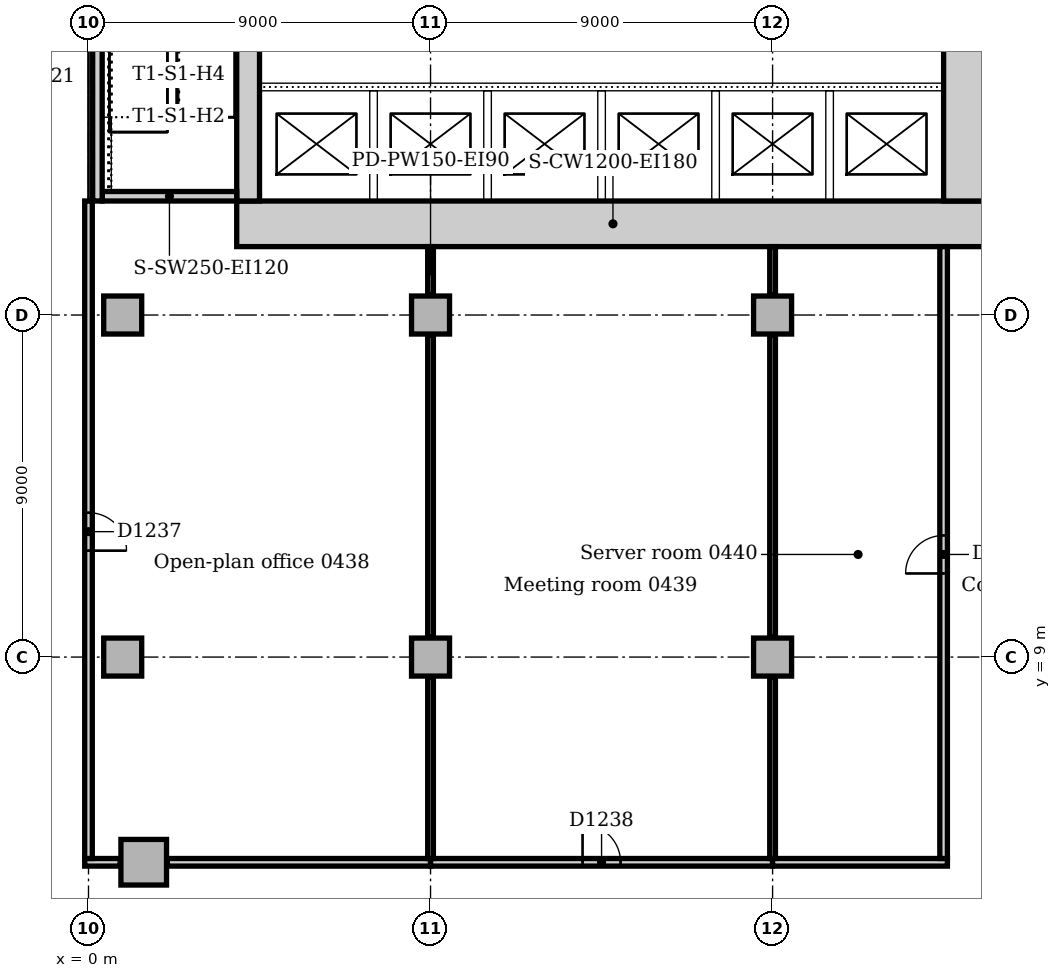
"""IFC4 building model, lengths in metres.
Left out: names, types, materials, properties, quantities, classifications, styles, units other than length and angle.
Written with IfcOpenShell. Run it as: python <this file> out.ifc"""

import sys

from ifc_helpers import new_model, si_unit, direction, frame, frame_2d, origin, origin_2d, place, context, subcontext, project, spatial, rectangle, extrude, element, fill, save


model = new_model("IFC4")
c1 = context("Model", 3, precision=1e-05, world=origin(), true_north=direction((0.0, 1.0)))
c2 = subcontext(c1, "Body", "Model", "MODEL_VIEW")
j1 = project(units=[si_unit("LENGTHUNIT", "METRE"), si_unit("PLANEANGLEUNIT", "RADIAN")], contexts=[c1])
p1 = place(None, origin())
s1 = spatial("IfcSite", under=j1, at=p1, CompositionType="ELEMENT")
p2 = place(p1, origin())
s2 = spatial("IfcBuilding", under=s1, at=p2, CompositionType="ELEMENT")
p3 = place(p2, frame((0.0, 0.0, 21.0)))
s3 = spatial("IfcBuildingStorey", under=s2, at=p3, CompositionType="ELEMENT", Elevation=21.0)
p4 = place(p3, frame((3.9, 20.4, 0.0), z_axis=(0.0, 0.0, 1.0), x_axis=(1.0, 0.0, 0.0)))
e1 = element("IfcWall", 1, at=p4, inside=s3, PredefinedType="SOLIDWALL", context=c2, shape_type="SweptSolid", body=[
    extrude(rectangle(XDim=19.8, YDim=1.2, at=frame_2d((9.9, 0.0))), origin(), (0.0, 0.0, 1.0), 5.0),
])
p5 = place(p3, frame((23.1, 21.0, 0.0), z_axis=(0.0, 0.0, 1.0), x_axis=(0.0, 1.0, 0.0)))
e2 = element("IfcWall", 2, at=p5, inside=s3, PredefinedType="SOLIDWALL", context=c2, shape_type="SweptSolid", body=[
    extrude(rectangle(XDim=10.5, YDim=1.2, at=frame_2d((5.25, 0.0))), origin(), (0.0, 0.0, 1.0), 5.0),
])
p6 = place(p5, frame((4.35, 0.0, 0.0)))
e3 = element("IfcOpeningElement", 3, at=p6, cuts=e2, PredefinedType="OPENING", context=c2, shape_type="SweptSolid", body=[
    extrude(rectangle(XDim=1.8, YDim=2.1, at=frame_2d((0.9, 1.05))), frame((0.0, 0.61, 0.0), z_axis=(0.0, -1.0, 0.0), x_axis=(1.0, 0.0, 0.0)), (0.0, 0.0, 1.0), 1.22),
])
p7 = place(p3, frame((4.2, 31.5, 0.0), z_axis=(0.0, 0.0, 1.0), x_axis=(0.0, -1.0, 0.0)))
e4 = element("IfcWall", 4, at=p7, inside=s3, PredefinedType="SOLIDWALL", context=c2, shape_type="SweptSolid", body=[
    extrude(rectangle(XDim=10.5, YDim=0.6, at=frame_2d((5.25, 0.0))), origin(), (0.0, 0.0, 1.0), 5.0),
])
p8 = place(p7, frame((4.25, 0.0, 0.0)))
e5 = element("IfcOpeningElement", 5, at=p8, cuts=e4, PredefinedType="OPENING", context=c2, shape_type="SweptSolid", body=[
    extrude(rectangle(XDim=1.0, YDim=2.1, at=frame_2d((0.5, 1.05))), frame((0.0, 0.31, 0.0), z_axis=(0.0, -1.0, 0.0), x_axis=(1.0, 0.0, 0.0)), (0.0, 0.0, 1.0), 0.62),
])
p9 = place(p3, frame((0.36, 21.125, 0.0), z_axis=(0.0, 0.0, 1.0), x_axis=(1.0, 0.0, 0.0)))
e6 = element("IfcWall", 6, at=p9, inside=s3, PredefinedType="SOLIDWALL", context=c2, shape_type="SweptSolid", body=[
    extrude(rectangle(XDim=3.54, YDim=0.25, at=frame_2d((1.77, 0.0))), origin(), (0.0, 0.0, 1.0), 5.0),
])
p10 = place(p3, frame((0.235, 21.0, 0.0), z_axis=(0.0, 0.0, 1.0), x_axis=(0.0, 1.0, 0.0)))
e7 = element("IfcWall", 7, at=p10, inside=s3, PredefinedType="SOLIDWALL", context=c2, shape_type="SweptSolid", body=[
    extrude(rectangle(XDim=21.0, YDim=0.25, at=frame_2d((10.5, 0.0))), origin(), (0.0, 0.0, 1.0), 5.0),
])
p11 = place(p3, frame((1.453, 3.602, 0.0), z_axis=(0.0, 0.0, 1.0), x_axis=(1.0, 0.0, 0.0)))
e8 = element("IfcColumn", 8, at=p11, inside=s3, PredefinedType="COLUMN", context=c2, shape_type="SweptSolid", body=[
    extrude(rectangle(XDim=1.2, YDim=1.2, at=origin_2d()), origin(), (0.0, 0.0, 1.0), 4.85),
])
for number, where, z_axis, x_axis in (
    (9, (0.9, 9.0, 0.0), (0.0, 0.0, 1.0), (1.0, 0.0, 0.0)),
    (10, (0.9, 18.0, 0.0), (0.0, 0.0, 1.0), (1.0, 0.0, 0.0)),
    (11, (9.0, 9.0, 0.0), (0.0, 0.0, 1.0), (1.0, 0.0, 0.0)),
    (12, (9.0, 18.0, 0.0), (0.0, 0.0, 1.0), (1.0, 0.0, 0.0)),
    (13, (18.0, 9.0, 0.0), (0.0, 0.0, 1.0), (1.0, 0.0, 0.0)),
    (14, (18.0, 18.0, 0.0), (0.0, 0.0, 1.0), (1.0, 0.0, 0.0)),
):
    element("IfcColumn", number, at=place(p3, frame(where, z_axis=z_axis, x_axis=x_axis)), inside=s3, PredefinedType="COLUMN", context=c2, shape_type="SweptSolid", body=[
        extrude(rectangle(XDim=1.0, YDim=1.0, at=origin_2d()), origin(), (0.0, 0.0, 1.0), 4.85),
    ])
p12 = place(p3, frame((-0.1, 3.6, 0.0), z_axis=(0.0, 0.0, 1.0), x_axis=(1.0, 0.0, 0.0)))
e15 = element("IfcWall", 15, at=p12, inside=s3, PredefinedType="PARTITIONING", context=c2, shape_type="SweptSolid", body=[
    extrude(rectangle(XDim=0.933, YDim=0.2, at=frame_2d((0.467, 0.0))), origin(), (0.0, 0.0, 1.0), 4.7),
])
p13 = place(p3, frame((2.073, 3.6, 0.0), z_axis=(0.0, 0.0, 1.0), x_axis=(1.0, 0.0, 0.0)))
e16 = element("IfcWall", 16, at=p13, inside=s3, PredefinedType="PARTITIONING", context=c2, shape_type="SweptSolid", body=[
    extrude(rectangle(XDim=6.927, YDim=0.2, at=frame_2d((3.463, 0.0))), origin(), (0.0, 0.0, 1.0), 4.85),
])
p14 = place(p3, frame((9.0, 3.6, 0.0), z_axis=(0.0, 0.0, 1.0), x_axis=(1.0, 0.0, 0.0)))
e17 = element("IfcWall", 17, at=p14, inside=s3, PredefinedType="PARTITIONING", context=c2, shape_type="SweptSolid", body=[
    extrude(rectangle(XDim=9.0, YDim=0.2, at=frame_2d((4.5, 0.0))), origin(), (0.0, 0.0, 1.0), 4.85),
])
p15 = place(p14, frame((4.0, 0.0, 0.0)))
e18 = element("IfcOpeningElement", 18, at=p15, cuts=e17, PredefinedType="OPENING", context=c2, shape_type="SweptSolid", body=[
    extrude(rectangle(XDim=1.0, YDim=2.1, at=frame_2d((0.5, 1.05))), frame((0.0, 0.11, 0.0), z_axis=(0.0, -1.0, 0.0), x_axis=(1.0, 0.0, 0.0)), (0.0, 0.0, 1.0), 0.22),
])
p16 = place(p3, frame((18.0, 3.6, 0.0), z_axis=(0.0, 0.0, 1.0), x_axis=(1.0, 0.0, 0.0)))
e19 = element("IfcWall", 19, at=p16, inside=s3, PredefinedType="PARTITIONING", context=c2, shape_type="SweptSolid", body=[
    extrude(rectangle(XDim=4.6, YDim=0.2, at=frame_2d((2.3, 0.0))), origin(), (0.0, 0.0, 1.0), 4.85),
])
p17 = place(p3, frame((22.5, 3.7, 0.0), z_axis=(0.0, 0.0, 1.0), x_axis=(0.0, 1.0, 0.0)))
e20 = element("IfcWall", 20, at=p17, inside=s3, PredefinedType="PARTITIONING", context=c2, shape_type="SweptSolid", body=[
    extrude(rectangle(XDim=16.1, YDim=0.2, at=frame_2d((8.05, 0.0))), origin(), (0.0, 0.0, 1.0), 4.85),
])
p18 = place(p17, frame((7.5, 0.0, 0.0)))
e21 = element("IfcOpeningElement", 21, at=p18, cuts=e20, PredefinedType="OPENING", context=c2, shape_type="SweptSolid", body=[
    extrude(rectangle(XDim=1.0, YDim=2.1, at=frame_2d((0.5, 1.05))), frame((0.0, 0.11, 0.0), z_axis=(0.0, -1.0, 0.0), x_axis=(1.0, 0.0, 0.0)), (0.0, 0.0, 1.0), 0.22),
])
p19 = place(p3, frame((0.0, 3.7, 0.0), z_axis=(0.0, 0.0, 1.0), x_axis=(0.0, 1.0, 0.0)))
e22 = element("IfcWall", 22, at=p19, inside=s3, PredefinedType="PARTITIONING", context=c2, shape_type="SweptSolid", body=[
    extrude(rectangle(XDim=17.3, YDim=0.2, at=frame_2d((8.65, 0.0))), origin(), (0.0, 0.0, 1.0), 4.85),
])
p20 = place(p19, frame((8.1, 0.0, 0.0)))
e23 = element("IfcOpeningElement", 23, at=p20, cuts=e22, PredefinedType="OPENING", context=c2, shape_type="SweptSolid", body=[
    extrude(rectangle(XDim=1.0, YDim=2.1, at=frame_2d((0.5, 1.05))), frame((0.0, 0.11, 0.0), z_axis=(0.0, -1.0, 0.0), x_axis=(1.0, 0.0, 0.0)), (0.0, 0.0, 1.0), 0.22),
])
p21 = place(p3, frame((9.0, 3.7, 0.0), z_axis=(0.0, 0.0, 1.0), x_axis=(0.0, 1.0, 0.0)))
e24 = element("IfcWall", 24, at=p21, inside=s3, PredefinedType="PARTITIONING", context=c2, shape_type="SweptSolid", body=[
    extrude(rectangle(XDim=4.78, YDim=0.15, at=frame_2d((2.39, 0.0))), origin(), (0.0, 0.0, 1.0), 4.158),
])
p22 = place(p3, frame((9.0, 9.52, 0.0), z_axis=(0.0, 0.0, 1.0), x_axis=(0.0, 1.0, 0.0)))
e25 = element("IfcWall", 25, at=p22, inside=s3, PredefinedType="PARTITIONING", context=c2, shape_type="SweptSolid", body=[
    extrude(rectangle(XDim=7.96, YDim=0.15, at=frame_2d((3.98, 0.0))), origin(), (0.0, 0.0, 1.0), 4.158),
])
p23 = place(p3, frame((9.0, 18.52, 0.0), z_axis=(0.0, 0.0, 1.0), x_axis=(0.0, 1.0, 0.0)))
e26 = element("IfcWall", 26, at=p23, inside=s3, PredefinedType="PARTITIONING", context=c2, shape_type="SweptSolid", body=[
    extrude(rectangle(XDim=1.28, YDim=0.15, at=frame_2d((0.64, 0.0))), origin(), (0.0, 0.0, 1.0), 4.652),
])
p24 = place(p3, frame((18.0, 3.7, 0.0), z_axis=(0.0, 0.0, 1.0), x_axis=(0.0, 1.0, 0.0)))
e27 = element("IfcWall", 27, at=p24, inside=s3, PredefinedType="PARTITIONING", context=c2, shape_type="SweptSolid", body=[
    extrude(rectangle(XDim=4.78, YDim=0.15, at=frame_2d((2.39, 0.0))), origin(), (0.0, 0.0, 1.0), 4.158),
])
p25 = place(p3, frame((18.0, 9.52, 0.0), z_axis=(0.0, 0.0, 1.0), x_axis=(0.0, 1.0, 0.0)))
e28 = element("IfcWall", 28, at=p25, inside=s3, PredefinedType="PARTITIONING", context=c2, shape_type="SweptSolid", body=[
    extrude(rectangle(XDim=7.96, YDim=0.15, at=frame_2d((3.98, 0.0))), origin(), (0.0, 0.0, 1.0), 4.158),
])
p26 = place(p3, frame((18.0, 18.52, 0.0), z_axis=(0.0, 0.0, 1.0), x_axis=(0.0, 1.0, 0.0)))
e29 = element("IfcWall", 29, at=p26, inside=s3, PredefinedType="PARTITIONING", context=c2, shape_type="SweptSolid", body=[
    extrude(rectangle(XDim=1.28, YDim=0.15, at=frame_2d((0.64, 0.0))), origin(), (0.0, 0.0, 1.0), 4.652),
])
p27 = place(p3, frame((0.48, 21.25, 0.0), z_axis=(0.0, 0.0, 1.0), x_axis=(0.0, 1.0, 0.0)))
e30 = element("IfcWall", 30, at=p27, inside=s3, PredefinedType="STANDARD", context=c2, shape_type="SweptSolid", body=[
    extrude(rectangle(XDim=1.955, YDim=0.24, at=frame_2d((0.978, 0.0))), origin(), (0.0, 0.0, 1.0), 5.0),
])
p28 = place(p3, frame((4.5, 24.0, 0.0), z_axis=(0.0, 0.0, 1.0), x_axis=(1.0, 0.0, 0.0)))
e31 = element("IfcWall", 31, at=p28, inside=s3, PredefinedType="PARTITIONING", context=c2, shape_type="SweptSolid", body=[
    extrude(rectangle(XDim=18.0, YDim=0.2, at=frame_2d((9.0, 0.0))), origin(), (0.0, 0.0, 1.0), 4.85),
])
p29 = place(p28, frame((0.95, 0.0, 0.0)))
e32 = element("IfcOpeningElement", 32, at=p29, cuts=e31, PredefinedType="OPENING", context=c2, shape_type="SweptSolid", body=[
    extrude(rectangle(XDim=1.1, YDim=2.1, at=frame_2d((0.55, 1.05))), frame((0.0, 0.11, 0.0), z_axis=(0.0, -1.0, 0.0), x_axis=(1.0, 0.0, 0.0)), (0.0, 0.0, 1.0), 0.22),
])
p30 = place(p28, frame((3.95, 0.0, 0.0)))
e33 = element("IfcOpeningElement", 33, at=p30, cuts=e31, PredefinedType="OPENING", context=c2, shape_type="SweptSolid", body=[
    extrude(rectangle(XDim=1.1, YDim=2.1, at=frame_2d((0.55, 1.05))), frame((0.0, 0.11, 0.0), z_axis=(0.0, -1.0, 0.0), x_axis=(1.0, 0.0, 0.0)), (0.0, 0.0, 1.0), 0.22),
])
p31 = place(p28, frame((6.95, 0.0, 0.0)))
e34 = element("IfcOpeningElement", 34, at=p31, cuts=e31, PredefinedType="OPENING", context=c2, shape_type="SweptSolid", body=[
    extrude(rectangle(XDim=1.1, YDim=2.1, at=frame_2d((0.55, 1.05))), frame((0.0, 0.11, 0.0), z_axis=(0.0, -1.0, 0.0), x_axis=(1.0, 0.0, 0.0)), (0.0, 0.0, 1.0), 0.22),
])
p32 = place(p28, frame((9.95, 0.0, 0.0)))
e35 = element("IfcOpeningElement", 35, at=p32, cuts=e31, PredefinedType="OPENING", context=c2, shape_type="SweptSolid", body=[
    extrude(rectangle(XDim=1.1, YDim=2.1, at=frame_2d((0.55, 1.05))), frame((0.0, 0.11, 0.0), z_axis=(0.0, -1.0, 0.0), x_axis=(1.0, 0.0, 0.0)), (0.0, 0.0, 1.0), 0.22),
])
p33 = place(p28, frame((12.95, 0.0, 0.0)))
e36 = element("IfcOpeningElement", 36, at=p33, cuts=e31, PredefinedType="OPENING", context=c2, shape_type="SweptSolid", body=[
    extrude(rectangle(XDim=1.1, YDim=2.1, at=frame_2d((0.55, 1.05))), frame((0.0, 0.11, 0.0), z_axis=(0.0, -1.0, 0.0), x_axis=(1.0, 0.0, 0.0)), (0.0, 0.0, 1.0), 0.22),
])
p34 = place(p28, frame((15.95, 0.0, 0.0)))
e37 = element("IfcOpeningElement", 37, at=p34, cuts=e31, PredefinedType="OPENING", context=c2, shape_type="SweptSolid", body=[
    extrude(rectangle(XDim=1.1, YDim=2.1, at=frame_2d((0.55, 1.05))), frame((0.0, 0.11, 0.0), z_axis=(0.0, -1.0, 0.0), x_axis=(1.0, 0.0, 0.0)), (0.0, 0.0, 1.0), 0.22),
])
for number, where, z_axis, x_axis in (
    (38, (7.5, 21.0, 0.0), (0.0, 0.0, 1.0), (0.0, 1.0, 0.0)),
    (39, (10.5, 21.0, 0.0), (0.0, 0.0, 1.0), (0.0, 1.0, 0.0)),
    (40, (13.5, 21.0, 0.0), (0.0, 0.0, 1.0), (0.0, 1.0, 0.0)),
    (41, (16.5, 21.0, 0.0), (0.0, 0.0, 1.0), (0.0, 1.0, 0.0)),
    (42, (19.5, 21.0, 0.0), (0.0, 0.0, 1.0), (0.0, 1.0, 0.0)),
):
    element("IfcWall", number, at=place(p3, frame(where, z_axis=z_axis, x_axis=x_axis)), inside=s3, PredefinedType="PARTITIONING", context=c2, shape_type="SweptSolid", body=[
        extrude(rectangle(XDim=2.9, YDim=0.2, at=frame_2d((1.45, 0.0))), origin(), (0.0, 0.0, 1.0), 4.85),
    ])
p35 = place(p20, frame((1.0, 0.0, 0.0), z_axis=(0.0, 0.0, 1.0), x_axis=(-1.0, 0.0, 0.0)))
e43 = element("IfcDoor", 43, at=p35, inside=s3, OperationType="SINGLE_SWING_RIGHT", PredefinedType="DOOR", context=c2, shape_type="SweptSolid", body=[
    extrude(rectangle(XDim=1.0, YDim=2.1, at=frame_2d((0.5, 1.05))), frame((0.0, 0.025, 0.0), z_axis=(0.0, -1.0, 0.0), x_axis=(1.0, 0.0, 0.0)), (0.0, 0.0, 1.0), 0.05),
])
fill(e23, e43)
p36 = place(p15, origin())
e44 = element("IfcDoor", 44, at=p36, inside=s3, OperationType="SINGLE_SWING_LEFT", PredefinedType="DOOR", context=c2, shape_type="SweptSolid", body=[
    extrude(rectangle(XDim=1.0, YDim=2.1, at=frame_2d((0.5, 1.05))), frame((0.0, 0.025, 0.0), z_axis=(0.0, -1.0, 0.0), x_axis=(1.0, 0.0, 0.0)), (0.0, 0.0, 1.0), 0.05),
])
fill(e18, e44)
p37 = place(p18, origin())
e45 = element("IfcDoor", 45, at=p37, inside=s3, OperationType="SINGLE_SWING_LEFT", PredefinedType="DOOR", context=c2, shape_type="SweptSolid", body=[
    extrude(rectangle(XDim=1.0, YDim=2.1, at=frame_2d((0.5, 1.05))), frame((0.0, 0.025, 0.0), z_axis=(0.0, -1.0, 0.0), x_axis=(1.0, 0.0, 0.0)), (0.0, 0.0, 1.0), 0.05),
])
fill(e21, e45)
p38 = place(p29, origin())
e46 = element("IfcDoor", 46, at=p38, inside=s3, OperationType="SLIDING_TO_LEFT", PredefinedType="DOOR", context=c2, shape_type="SweptSolid", body=[
    extrude(rectangle(XDim=1.1, YDim=2.1, at=frame_2d((0.55, 1.05))), frame((0.0, 0.025, 0.0), z_axis=(0.0, -1.0, 0.0), x_axis=(1.0, 0.0, 0.0)), (0.0, 0.0, 1.0), 0.05),
])
fill(e32, e46)
p39 = place(p30, origin())
e47 = element("IfcDoor", 47, at=p39, inside=s3, OperationType="SLIDING_TO_LEFT", PredefinedType="DOOR", context=c2, shape_type="SweptSolid", body=[
    extrude(rectangle(XDim=1.1, YDim=2.1, at=frame_2d((0.55, 1.05))), frame((0.0, 0.025, 0.0), z_axis=(0.0, -1.0, 0.0), x_axis=(1.0, 0.0, 0.0)), (0.0, 0.0, 1.0), 0.05),
])
fill(e33, e47)
p40 = place(p31, origin())
e48 = element("IfcDoor", 48, at=p40, inside=s3, OperationType="SLIDING_TO_LEFT", PredefinedType="DOOR", context=c2, shape_type="SweptSolid", body=[
    extrude(rectangle(XDim=1.1, YDim=2.1, at=frame_2d((0.55, 1.05))), frame((0.0, 0.025, 0.0), z_axis=(0.0, -1.0, 0.0), x_axis=(1.0, 0.0, 0.0)), (0.0, 0.0, 1.0), 0.05),
])
fill(e34, e48)
p41 = place(p32, origin())
e49 = element("IfcDoor", 49, at=p41, inside=s3, OperationType="SLIDING_TO_LEFT", PredefinedType="DOOR", context=c2, shape_type="SweptSolid", body=[
    extrude(rectangle(XDim=1.1, YDim=2.1, at=frame_2d((0.55, 1.05))), frame((0.0, 0.025, 0.0), z_axis=(0.0, -1.0, 0.0), x_axis=(1.0, 0.0, 0.0)), (0.0, 0.0, 1.0), 0.05),
])
fill(e35, e49)
p42 = place(p33, origin())
e50 = element("IfcDoor", 50, at=p42, inside=s3, OperationType="SLIDING_TO_LEFT", PredefinedType="DOOR", context=c2, shape_type="SweptSolid", body=[
    extrude(rectangle(XDim=1.1, YDim=2.1, at=frame_2d((0.55, 1.05))), frame((0.0, 0.025, 0.0), z_axis=(0.0, -1.0, 0.0), x_axis=(1.0, 0.0, 0.0)), (0.0, 0.0, 1.0), 0.05),
])
fill(e36, e50)
p43 = place(p34, origin())
e51 = element("IfcDoor", 51, at=p43, inside=s3, OperationType="SLIDING_TO_LEFT", PredefinedType="DOOR", context=c2, shape_type="SweptSolid", body=[
    extrude(rectangle(XDim=1.1, YDim=2.1, at=frame_2d((0.55, 1.05))), frame((0.0, 0.025, 0.0), z_axis=(0.0, -1.0, 0.0), x_axis=(1.0, 0.0, 0.0)), (0.0, 0.0, 1.0), 0.05),
])
fill(e37, e51)
save(model, sys.argv[1])
